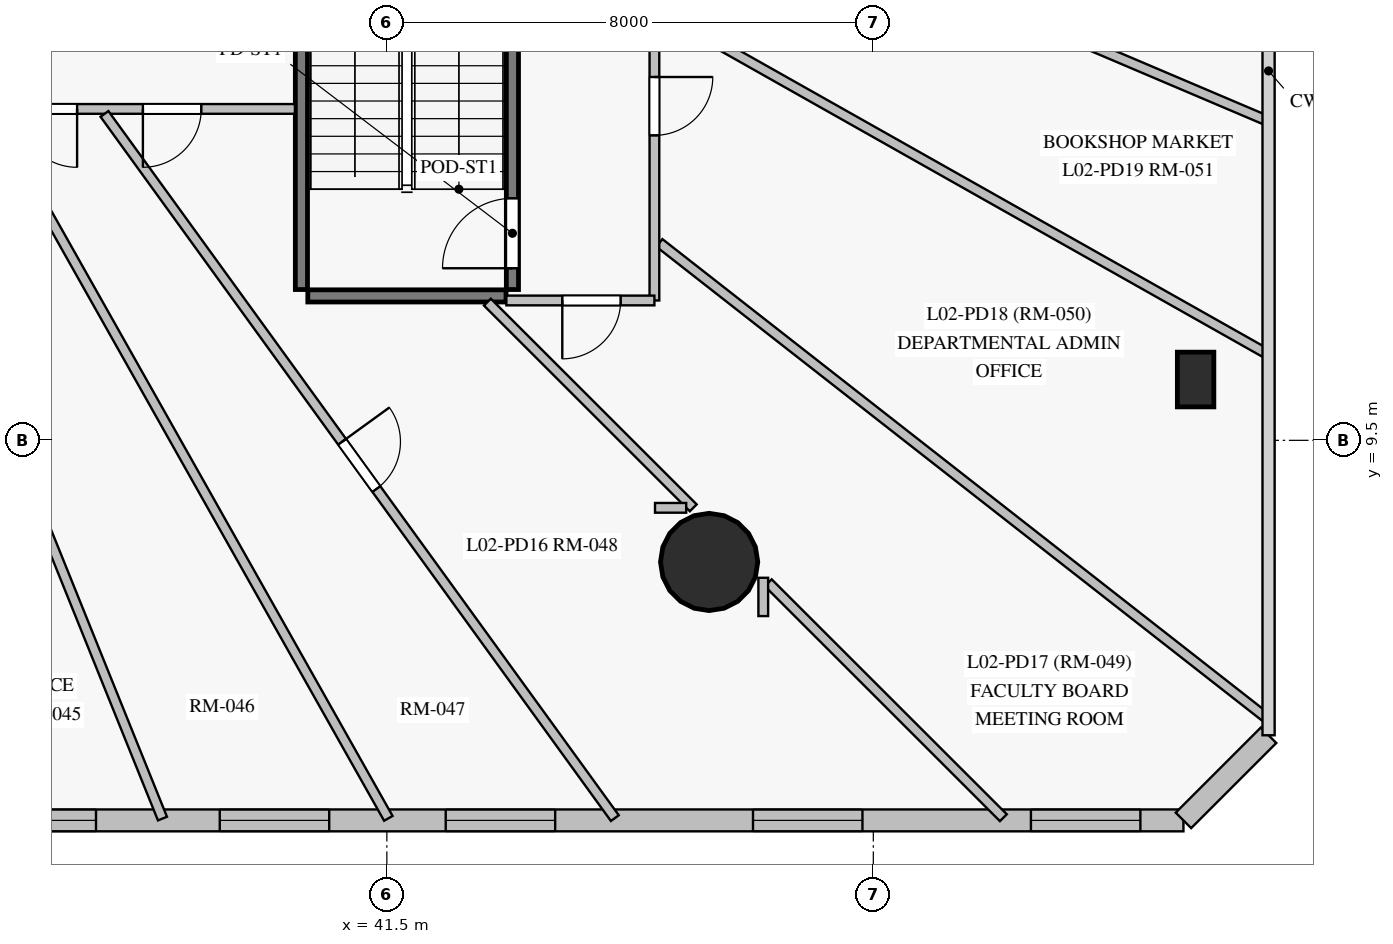
"""IFC4 building model, lengths in metres.
Left out: names, types, materials, properties, quantities, classifications, styles, units other than length and angle.
Written with IfcOpenShell. Run it as: python <this file> out.ifc"""

import sys

from ifc_helpers import new_model, si_unit, direction, frame, frame_2d, origin, origin_with_axes, origin_2d, place, context, subcontext, project, spatial, rectangle, circle, extrude, source, transform, mapped, element, fill, save


model = new_model("IFC4")
c1 = context("Model", 3, precision=1e-05, world=origin(), true_north=direction((0.0, 1.0)))
c2 = subcontext(c1, "Body", "Model", "MODEL_VIEW")
j1 = project(units=[si_unit("LENGTHUNIT", "METRE"), si_unit("PLANEANGLEUNIT", "RADIAN")], contexts=[c1])
p1 = place(None, origin())
s1 = spatial("IfcSite", under=j1, at=p1, CompositionType="ELEMENT")
p2 = place(p1, origin())
s2 = spatial("IfcBuilding", under=s1, at=p2, CompositionType="ELEMENT")
p3 = place(p2, frame((0.0, 0.0, 9.0)))
s3 = spatial("IfcBuildingStorey", under=s2, at=p3, CompositionType="ELEMENT", Elevation=9.0)
m1 = source(origin_with_axes(), c2, "Body", "SweptSolid", [
    extrude(circle(Radius=0.8, at=origin_2d()), origin(), (0.0, 0.0, 1.0), 4.5),
])
p4 = place(p3, frame((46.8, 7.5, 0.0), z_axis=(0.0, 0.0, 1.0), x_axis=(1.0, 0.0, 0.0)))
e1 = element("IfcColumn", 1, at=p4, inside=s3, PredefinedType="COLUMN", context=c2, shape_type="MappedRepresentation", body=[
    mapped(m1, transform((0.0, 0.0, 0.0), scale=1.0)),
])
m2 = source(origin_with_axes(), c2, "Body", "SweptSolid", [
    extrude(rectangle(XDim=0.6, YDim=0.9, at=origin_2d()), origin(), (0.0, 0.0, 1.0), 4.5),
])
p5 = place(p3, frame((54.8, 10.5, 0.0), z_axis=(0.0, 0.0, 1.0), x_axis=(1.0, 0.0, 0.0)))
e2 = element("IfcColumn", 2, at=p5, inside=s3, PredefinedType="PILASTER", context=c2, shape_type="MappedRepresentation", body=[
    mapped(m2, transform((0.0, 0.0, 0.0), scale=1.0)),
])
p6 = place(p3, frame((5.35, 3.25, 0.0), z_axis=(0.0, 0.0, 1.0), x_axis=(1.0, 0.0, 0.0)))
e3 = element("IfcWall", 3, at=p6, inside=s3, PredefinedType="SOLIDWALL", context=c2, shape_type="SweptSolid", body=[
    extrude(rectangle(XDim=49.25, YDim=0.36, at=frame_2d((24.625, 0.0))), origin(), (0.0, 0.0, 1.0), 4.2),
])
p7 = place(p6, frame((4.952, 0.0, 0.85)))
e4 = element("IfcOpeningElement", 4, at=p7, cuts=e3, PredefinedType="OPENING", context=c2, shape_type="SweptSolid", body=[
    extrude(rectangle(XDim=1.8, YDim=2.2, at=frame_2d((0.9, 1.1))), frame((0.0, 0.19, 0.0), z_axis=(0.0, -1.0, 0.0), x_axis=(1.0, 0.0, 0.0)), (0.0, 0.0, 1.0), 0.38),
])
p8 = place(p6, frame((11.45, 0.0, 0.85)))
e5 = element("IfcOpeningElement", 5, at=p8, cuts=e3, PredefinedType="OPENING", context=c2, shape_type="SweptSolid", body=[
    extrude(rectangle(XDim=1.8, YDim=2.2, at=frame_2d((0.9, 1.1))), frame((0.0, 0.19, 0.0), z_axis=(0.0, -1.0, 0.0), x_axis=(1.0, 0.0, 0.0)), (0.0, 0.0, 1.0), 0.38),
])
p9 = place(p6, frame((17.05, 0.0, 0.85)))
e6 = element("IfcOpeningElement", 6, at=p9, cuts=e3, PredefinedType="OPENING", context=c2, shape_type="SweptSolid", body=[
    extrude(rectangle(XDim=1.8, YDim=2.2, at=frame_2d((0.9, 1.1))), frame((0.0, 0.19, 0.0), z_axis=(0.0, -1.0, 0.0), x_axis=(1.0, 0.0, 0.0)), (0.0, 0.0, 1.0), 0.38),
])
p10 = place(p6, frame((23.505, 0.0, 0.85)))
e7 = element("IfcOpeningElement", 7, at=p10, cuts=e3, PredefinedType="OPENING", context=c2, shape_type="SweptSolid", body=[
    extrude(rectangle(XDim=1.8, YDim=2.2, at=frame_2d((0.9, 1.1))), frame((0.0, 0.19, 0.0), z_axis=(0.0, -1.0, 0.0), x_axis=(1.0, 0.0, 0.0)), (0.0, 0.0, 1.0), 0.38),
])
p11 = place(p6, frame((29.567, 0.0, 0.85)))
e8 = element("IfcOpeningElement", 8, at=p11, cuts=e3, PredefinedType="OPENING", context=c2, shape_type="SweptSolid", body=[
    extrude(rectangle(XDim=1.8, YDim=2.2, at=frame_2d((0.9, 1.1))), frame((0.0, 0.19, 0.0), z_axis=(0.0, -1.0, 0.0), x_axis=(1.0, 0.0, 0.0)), (0.0, 0.0, 1.0), 0.38),
])
p12 = place(p6, frame((33.402, 0.0, 0.85)))
e9 = element("IfcOpeningElement", 9, at=p12, cuts=e3, PredefinedType="OPENING", context=c2, shape_type="SweptSolid", body=[
    extrude(rectangle(XDim=1.8, YDim=2.2, at=frame_2d((0.9, 1.1))), frame((0.0, 0.19, 0.0), z_axis=(0.0, -1.0, 0.0), x_axis=(1.0, 0.0, 0.0)), (0.0, 0.0, 1.0), 0.38),
])
p13 = place(p6, frame((37.118, 0.0, 0.85)))
e10 = element("IfcOpeningElement", 10, at=p13, cuts=e3, PredefinedType="OPENING", context=c2, shape_type="SweptSolid", body=[
    extrude(rectangle(XDim=1.8, YDim=2.2, at=frame_2d((0.9, 1.1))), frame((0.0, 0.19, 0.0), z_axis=(0.0, -1.0, 0.0), x_axis=(1.0, 0.0, 0.0)), (0.0, 0.0, 1.0), 0.38),
])
p14 = place(p6, frame((42.171, 0.0, 0.85)))
e11 = element("IfcOpeningElement", 11, at=p14, cuts=e3, PredefinedType="OPENING", context=c2, shape_type="SweptSolid", body=[
    extrude(rectangle(XDim=1.8, YDim=2.2, at=frame_2d((0.9, 1.1))), frame((0.0, 0.19, 0.0), z_axis=(0.0, -1.0, 0.0), x_axis=(1.0, 0.0, 0.0)), (0.0, 0.0, 1.0), 0.38),
])
p15 = place(p6, frame((46.742, 0.0, 0.85)))
e12 = element("IfcOpeningElement", 12, at=p15, cuts=e3, PredefinedType="OPENING", context=c2, shape_type="SweptSolid", body=[
    extrude(rectangle(XDim=1.8, YDim=2.2, at=frame_2d((0.9, 1.1))), frame((0.0, 0.19, 0.0), z_axis=(0.0, -1.0, 0.0), x_axis=(1.0, 0.0, 0.0)), (0.0, 0.0, 1.0), 0.38),
])
p16 = place(p3, frame((54.6, 3.25, 0.0), z_axis=(0.0, 0.0, 1.0), x_axis=(0.707106781187, 0.707106781187, 0.0)))
e13 = element("IfcWall", 13, at=p16, inside=s3, PredefinedType="SOLIDWALL", context=c2, shape_type="SweptSolid", body=[
    extrude(rectangle(XDim=1.98, YDim=0.36, at=frame_2d((0.99, 0.0))), origin(), (0.0, 0.0, 1.0), 4.2),
])
p17 = place(p3, frame((40.095, 11.98, 0.0), z_axis=(0.0, 0.0, 1.0), x_axis=(0.0, 1.0, 0.0)))
e14 = element("IfcWall", 14, at=p17, inside=s3, PredefinedType="SHEAR", context=c2, shape_type="SweptSolid", body=[
    extrude(rectangle(XDim=7.35, YDim=0.2, at=frame_2d((3.675, 0.0))), origin(), (0.0, 0.0, 1.0), 4.2),
])
p18 = place(p3, frame((43.565, 11.98, 0.0), z_axis=(0.0, 0.0, 1.0), x_axis=(0.0, 1.0, 0.0)))
e15 = element("IfcWall", 15, at=p18, inside=s3, PredefinedType="SHEAR", context=c2, shape_type="SweptSolid", body=[
    extrude(rectangle(XDim=7.35, YDim=0.2, at=frame_2d((3.675, 0.0))), origin(), (0.0, 0.0, 1.0), 4.2),
])
p19 = place(p18, frame((0.35, 0.0, 0.0)))
e16 = element("IfcOpeningElement", 16, at=p19, cuts=e15, PredefinedType="OPENING", context=c2, shape_type="SweptSolid", body=[
    extrude(rectangle(XDim=1.15, YDim=2.15, at=frame_2d((0.575, 1.075))), frame((0.0, 0.11, 0.0), z_axis=(0.0, -1.0, 0.0), x_axis=(1.0, 0.0, 0.0)), (0.0, 0.0, 1.0), 0.22),
])
p20 = place(p3, frame((40.2, 11.875, 0.0), z_axis=(0.0, 0.0, 1.0), x_axis=(1.0, 0.0, 0.0)))
e17 = element("IfcWall", 17, at=p20, inside=s3, PredefinedType="SHEAR", context=c2, shape_type="SweptSolid", body=[
    extrude(rectangle(XDim=3.26, YDim=0.2, at=frame_2d((1.63, 0.0))), origin(), (0.0, 0.0, 1.0), 4.2),
])
p21 = place(p3, frame((40.932, 21.151, 0.0), z_axis=(0.0, 0.0, 1.0), x_axis=(0.920324867376, -0.39115487788, 0.0)))
e18 = element("IfcWall", 18, at=p21, inside=s3, PredefinedType="PARTITIONING", context=c2, shape_type="SweptSolid", body=[
    extrude(rectangle(XDim=16.34, YDim=0.16, at=frame_2d((8.17, 0.0))), origin(), (0.0, 0.0, 1.0), 4.2),
])
p22 = place(p21, frame((7.677, 0.0, 0.0)))
e19 = element("IfcOpeningElement", 19, at=p22, cuts=e18, PredefinedType="OPENING", context=c2, shape_type="SweptSolid", body=[
    extrude(rectangle(XDim=0.96, YDim=2.15, at=frame_2d((0.48, 1.075))), frame((0.0, 0.09, 0.0), z_axis=(0.0, -1.0, 0.0), x_axis=(1.0, 0.0, 0.0)), (0.0, 0.0, 1.0), 0.18),
])
p23 = place(p3, frame((39.988, 14.95, 0.0), z_axis=(0.0, 0.0, 1.0), x_axis=(-1.0, 0.0, 0.0)))
e20 = element("IfcWall", 20, at=p23, inside=s3, PredefinedType="PARTITIONING", context=c2, shape_type="SweptSolid", body=[
    extrude(rectangle(XDim=14.588, YDim=0.16, at=frame_2d((7.294, 0.0))), origin(), (0.0, 0.0, 1.0), 4.2),
])
p24 = place(p23, frame((10.34, 0.0, 0.0)))
e21 = element("IfcOpeningElement", 21, at=p24, cuts=e20, PredefinedType="OPENING", context=c2, shape_type="SweptSolid", body=[
    extrude(rectangle(XDim=0.96, YDim=2.15, at=frame_2d((0.48, 1.075))), frame((0.0, 0.09, 0.0), z_axis=(0.0, -1.0, 0.0), x_axis=(1.0, 0.0, 0.0)), (0.0, 0.0, 1.0), 0.18),
])
p25 = place(p23, frame((7.608, 0.0, 0.0)))
e22 = element("IfcOpeningElement", 22, at=p25, cuts=e20, PredefinedType="OPENING", context=c2, shape_type="SweptSolid", body=[
    extrude(rectangle(XDim=0.96, YDim=2.15, at=frame_2d((0.48, 1.075))), frame((0.0, 0.09, 0.0), z_axis=(0.0, -1.0, 0.0), x_axis=(1.0, 0.0, 0.0)), (0.0, 0.0, 1.0), 0.18),
])
p26 = place(p23, frame((5.545, 0.0, 0.0)))
e23 = element("IfcOpeningElement", 23, at=p26, cuts=e20, PredefinedType="OPENING", context=c2, shape_type="SweptSolid", body=[
    extrude(rectangle(XDim=0.96, YDim=2.15, at=frame_2d((0.48, 1.075))), frame((0.0, 0.09, 0.0), z_axis=(0.0, -1.0, 0.0), x_axis=(1.0, 0.0, 0.0)), (0.0, 0.0, 1.0), 0.18),
])
p27 = place(p23, frame((3.582, 0.0, 0.0)))
e24 = element("IfcOpeningElement", 24, at=p27, cuts=e20, PredefinedType="OPENING", context=c2, shape_type="SweptSolid", body=[
    extrude(rectangle(XDim=0.96, YDim=2.15, at=frame_2d((0.48, 1.075))), frame((0.0, 0.09, 0.0), z_axis=(0.0, -1.0, 0.0), x_axis=(1.0, 0.0, 0.0)), (0.0, 0.0, 1.0), 0.18),
])
p28 = place(p23, frame((1.54, 0.0, 0.0)))
e25 = element("IfcOpeningElement", 25, at=p28, cuts=e20, PredefinedType="OPENING", context=c2, shape_type="SweptSolid", body=[
    extrude(rectangle(XDim=0.96, YDim=2.15, at=frame_2d((0.48, 1.075))), frame((0.0, 0.09, 0.0), z_axis=(0.0, -1.0, 0.0), x_axis=(1.0, 0.0, 0.0)), (0.0, 0.0, 1.0), 0.18),
])
p29 = place(p3, frame((36.856, 14.868, 0.0), z_axis=(0.0, 0.0, 1.0), x_axis=(0.586848404005, -0.809696826422, 0.0)))
e26 = element("IfcWall", 26, at=p29, inside=s3, PredefinedType="PARTITIONING", context=c2, shape_type="SweptSolid", body=[
    extrude(rectangle(XDim=14.302, YDim=0.16, at=frame_2d((7.151, 0.0))), origin(), (0.0, 0.0, 1.0), 4.2),
])
p30 = place(p29, frame((6.659, 0.0, 0.0)))
e27 = element("IfcOpeningElement", 27, at=p30, cuts=e26, PredefinedType="OPENING", context=c2, shape_type="SweptSolid", body=[
    extrude(rectangle(XDim=0.96, YDim=2.15, at=frame_2d((0.48, 1.075))), frame((0.0, 0.09, 0.0), z_axis=(0.0, -1.0, 0.0), x_axis=(1.0, 0.0, 0.0)), (0.0, 0.0, 1.0), 0.18),
])
p31 = place(p3, frame((34.991, 14.868, 0.0), z_axis=(0.0, 0.0, 1.0), x_axis=(0.491242274215, -0.871022977897, 0.0)))
e28 = element("IfcWall", 28, at=p31, inside=s3, PredefinedType="PARTITIONING", context=c2, shape_type="SweptSolid", body=[
    extrude(rectangle(XDim=13.3, YDim=0.16, at=frame_2d((6.65, 0.0))), origin(), (0.0, 0.0, 1.0), 4.2),
])
p32 = place(p3, frame((45.982, 12.746, 0.0), z_axis=(0.0, 0.0, 1.0), x_axis=(0.787599730353, -0.616187199436, 0.0)))
e29 = element("IfcWall", 29, at=p32, inside=s3, PredefinedType="PARTITIONING", context=c2, shape_type="SweptSolid", body=[
    extrude(rectangle(XDim=12.67, YDim=0.16, at=frame_2d((6.335, 0.0))), origin(), (0.0, 0.0, 1.0), 4.2),
])
p33 = place(p3, frame((33.126, 14.882, 0.0), z_axis=(0.0, 0.0, 1.0), x_axis=(0.374369486299, -0.927279616798, 0.0)))
e30 = element("IfcWall", 30, at=p33, inside=s3, PredefinedType="PARTITIONING", context=c2, shape_type="SweptSolid", body=[
    extrude(rectangle(XDim=12.512, YDim=0.16, at=frame_2d((6.256, 0.0))), origin(), (0.0, 0.0, 1.0), 4.2),
])
p34 = place(p3, frame((45.982, 16.563, 0.0), z_axis=(0.0, 0.0, 1.0), x_axis=(0.870851801876, -0.491545663362, 0.0)))
e31 = element("IfcWall", 31, at=p34, inside=s3, PredefinedType="PARTITIONING", context=c2, shape_type="SweptSolid", body=[
    extrude(rectangle(XDim=11.465, YDim=0.16, at=frame_2d((5.733, 0.0))), origin(), (0.0, 0.0, 1.0), 4.2),
])
p35 = place(p3, frame((45.9, 18.2, 0.0), z_axis=(0.0, 0.0, 1.0), x_axis=(0.0, -1.0, 0.0)))
e32 = element("IfcWall", 32, at=p35, inside=s3, PredefinedType="PARTITIONING", context=c2, shape_type="SweptSolid", body=[
    extrude(rectangle(XDim=6.4, YDim=0.16, at=frame_2d((3.2, 0.0))), origin(), (0.0, 0.0, 1.0), 4.2),
])
p36 = place(p35, frame((2.725, 0.0, 0.0)))
e33 = element("IfcOpeningElement", 33, at=p36, cuts=e32, PredefinedType="OPENING", context=c2, shape_type="SweptSolid", body=[
    extrude(rectangle(XDim=0.96, YDim=2.15, at=frame_2d((0.48, 1.075))), frame((0.0, 0.09, 0.0), z_axis=(0.0, -1.0, 0.0), x_axis=(1.0, 0.0, 0.0)), (0.0, 0.0, 1.0), 0.18),
])
p37 = place(p3, frame((47.772, 7.158, 0.0), z_axis=(0.0, 0.0, 1.0), x_axis=(0.707397041121, -0.706816402055, 0.0)))
e34 = element("IfcWall", 34, at=p37, inside=s3, PredefinedType="PARTITIONING", context=c2, shape_type="SweptSolid", body=[
    extrude(rectangle(XDim=5.466, YDim=0.16, at=frame_2d((2.733, 0.0))), origin(), (0.0, 0.0, 1.0), 4.2),
])
p38 = place(p3, frame((43.153, 11.773, 0.0), z_axis=(0.0, 0.0, 1.0), x_axis=(0.707361787394, -0.706851682982, 0.0)))
e35 = element("IfcWall", 35, at=p38, inside=s3, PredefinedType="PARTITIONING", context=c2, shape_type="SweptSolid", body=[
    extrude(rectangle(XDim=4.786, YDim=0.16, at=frame_2d((2.393, 0.0))), origin(), (0.0, 0.0, 1.0), 3.25),
])
p39 = place(p3, frame((45.9, 11.8, 0.0), z_axis=(0.0, 0.0, 1.0), x_axis=(-1.0, 0.0, 0.0)))
e36 = element("IfcWall", 36, at=p39, inside=s3, PredefinedType="PARTITIONING", context=c2, shape_type="SweptSolid", body=[
    extrude(rectangle(XDim=2.435, YDim=0.16, at=frame_2d((1.217, 0.0))), origin(), (0.0, 0.0, 1.0), 4.2),
])
p40 = place(p39, frame((0.555, 0.0, 0.0)))
e37 = element("IfcOpeningElement", 37, at=p40, cuts=e36, PredefinedType="OPENING", context=c2, shape_type="SweptSolid", body=[
    extrude(rectangle(XDim=0.96, YDim=2.15, at=frame_2d((0.48, 1.075))), frame((0.0, 0.09, 0.0), z_axis=(0.0, -1.0, 0.0), x_axis=(1.0, 0.0, 0.0)), (0.0, 0.0, 1.0), 0.18),
])
p41 = place(p3, frame((47.69, 6.61, 0.0), z_axis=(0.0, 0.0, 1.0), x_axis=(0.0, 1.0, 0.0)))
e38 = element("IfcWall", 38, at=p41, inside=s3, PredefinedType="PARTITIONING", context=c2, shape_type="SweptSolid", body=[
    extrude(rectangle(XDim=0.629, YDim=0.16, at=frame_2d((0.315, 0.0))), origin(), (0.0, 0.0, 1.0), 4.2),
])
p42 = place(p3, frame((46.423, 8.39, 0.0), z_axis=(0.0, 0.0, 1.0), x_axis=(-1.0, 0.0, 0.0)))
e39 = element("IfcWall", 39, at=p42, inside=s3, PredefinedType="PARTITIONING", context=c2, shape_type="SweptSolid", body=[
    extrude(rectangle(XDim=0.513, YDim=0.16, at=frame_2d((0.256, 0.0))), origin(), (0.0, 0.0, 1.0), 4.2),
])
m3 = source(origin_with_axes(), c2, "Body", "SweptSolid", [
    extrude(rectangle(XDim=1.8, YDim=2.2, at=frame_2d((0.9, 1.1))), frame((0.0, 0.03, 0.0), z_axis=(0.0, -1.0, 0.0), x_axis=(1.0, 0.0, 0.0)), (0.0, 0.0, 1.0), 0.06),
])
p43 = place(p11, origin())
e40 = element("IfcWindow", 40, at=p43, inside=s3, PartitioningType="SINGLE_PANEL", PredefinedType="WINDOW", context=c2, shape_type="MappedRepresentation", body=[
    mapped(m3, transform((0.0, 0.0, 0.0), scale=1.0)),
])
fill(e8, e40)
p44 = place(p12, origin())
e41 = element("IfcWindow", 41, at=p44, inside=s3, PartitioningType="SINGLE_PANEL", PredefinedType="WINDOW", context=c2, shape_type="MappedRepresentation", body=[
    mapped(m3, transform((0.0, 0.0, 0.0), scale=1.0)),
])
fill(e9, e41)
p45 = place(p13, origin())
e42 = element("IfcWindow", 42, at=p45, inside=s3, PartitioningType="SINGLE_PANEL", PredefinedType="WINDOW", context=c2, shape_type="MappedRepresentation", body=[
    mapped(m3, transform((0.0, 0.0, 0.0), scale=1.0)),
])
fill(e10, e42)
p46 = place(p14, origin())
e43 = element("IfcWindow", 43, at=p46, inside=s3, PartitioningType="SINGLE_PANEL", PredefinedType="WINDOW", context=c2, shape_type="MappedRepresentation", body=[
    mapped(m3, transform((0.0, 0.0, 0.0), scale=1.0)),
])
fill(e11, e43)
p47 = place(p15, origin())
e44 = element("IfcWindow", 44, at=p47, inside=s3, PartitioningType="SINGLE_PANEL", PredefinedType="WINDOW", context=c2, shape_type="MappedRepresentation", body=[
    mapped(m3, transform((0.0, 0.0, 0.0), scale=1.0)),
])
fill(e12, e44)
m4 = source(origin_with_axes(), c2, "Body", "SweptSolid", [
    extrude(rectangle(XDim=1.15, YDim=2.15, at=frame_2d((0.575, 1.075))), frame((0.0, 0.025, 0.0), z_axis=(0.0, -1.0, 0.0), x_axis=(1.0, 0.0, 0.0)), (0.0, 0.0, 1.0), 0.05),
])
p48 = place(p19, origin())
e45 = element("IfcDoor", 45, at=p48, inside=s3, OperationType="SINGLE_SWING_LEFT", PredefinedType="DOOR", context=c2, shape_type="MappedRepresentation", body=[
    mapped(m4, transform((0.0, 0.0, 0.0), scale=1.0)),
])
fill(e16, e45)
m5 = source(origin_with_axes(), c2, "Body", "SweptSolid", [
    extrude(rectangle(XDim=0.96, YDim=2.15, at=frame_2d((0.48, 1.075))), frame((0.0, 0.025, 0.0), z_axis=(0.0, -1.0, 0.0), x_axis=(1.0, 0.0, 0.0)), (0.0, 0.0, 1.0), 0.05),
])
p49 = place(p27, origin())
e46 = element("IfcDoor", 46, at=p49, inside=s3, OperationType="SINGLE_SWING_LEFT", PredefinedType="DOOR", context=c2, shape_type="MappedRepresentation", body=[
    mapped(m5, transform((0.0, 0.0, 0.0), scale=1.0)),
])
fill(e24, e46)
p50 = place(p28, origin())
e47 = element("IfcDoor", 47, at=p50, inside=s3, OperationType="SINGLE_SWING_RIGHT", PredefinedType="DOOR", context=c2, shape_type="MappedRepresentation", body=[
    mapped(m5, transform((0.0, 0.0, 0.0), scale=1.0)),
])
fill(e25, e47)
p51 = place(p30, origin())
e48 = element("IfcDoor", 48, at=p51, inside=s3, OperationType="SINGLE_SWING_LEFT", PredefinedType="DOOR", context=c2, shape_type="MappedRepresentation", body=[
    mapped(m5, transform((0.0, 0.0, 0.0), scale=1.0)),
])
fill(e27, e48)
p52 = place(p40, origin())
e49 = element("IfcDoor", 49, at=p52, inside=s3, OperationType="SINGLE_SWING_RIGHT", PredefinedType="DOOR", context=c2, shape_type="MappedRepresentation", body=[
    mapped(m5, transform((0.0, 0.0, 0.0), scale=1.0)),
])
fill(e37, e49)
p53 = place(p36, origin())
e50 = element("IfcDoor", 50, at=p53, inside=s3, OperationType="SINGLE_SWING_LEFT", PredefinedType="DOOR", context=c2, shape_type="MappedRepresentation", body=[
    mapped(m5, transform((0.0, 0.0, 0.0), scale=1.0)),
])
fill(e33, e50)
save(model, sys.argv[1])
